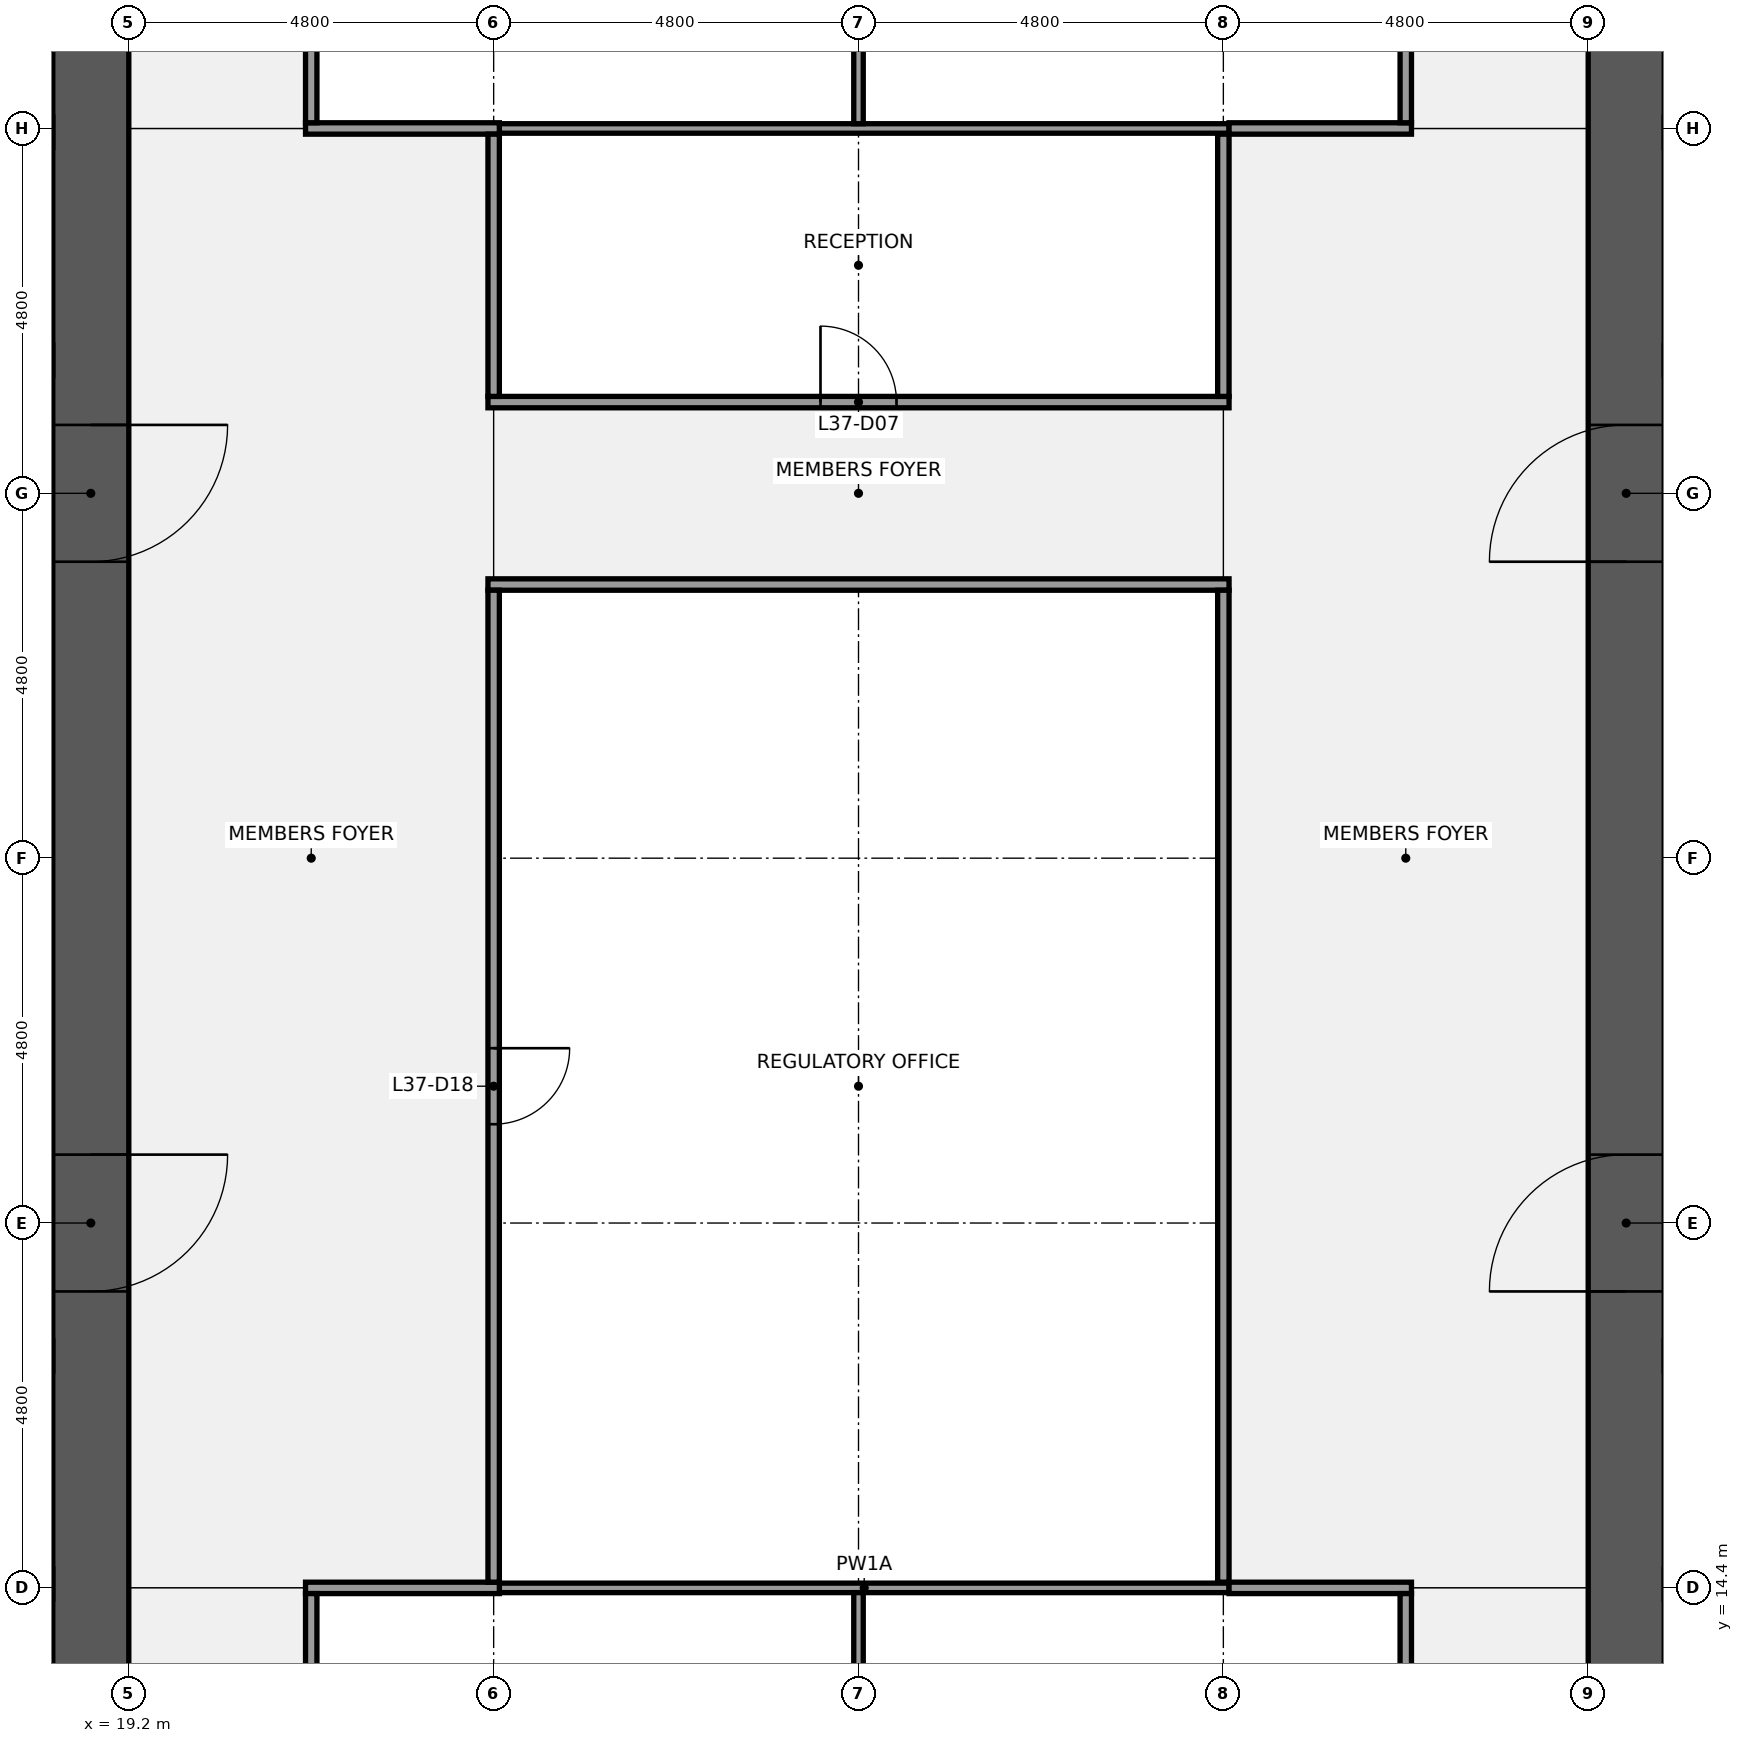
"""IFC4 building model, lengths in metres.
Left out: names, types, materials, properties, quantities, classifications, styles, units other than length and angle.
Written with IfcOpenShell. Run it as: python <this file> out.ifc"""

import sys

from ifc_helpers import new_model, si_unit, direction, frame, frame_2d, origin, place, context, subcontext, project, spatial, rectangle, extrude, element, fill, save


model = new_model("IFC4")
c1 = context("Model", 3, precision=1e-05, world=origin(), true_north=direction((0.0, 1.0)))
c2 = subcontext(c1, "Body", "Model", "MODEL_VIEW")
j1 = project(units=[si_unit("LENGTHUNIT", "METRE"), si_unit("PLANEANGLEUNIT", "RADIAN")], contexts=[c1])
p1 = place(None, origin())
s1 = spatial("IfcSite", under=j1, at=p1, CompositionType="ELEMENT")
p2 = place(p1, origin())
s2 = spatial("IfcBuilding", under=s1, at=p2, CompositionType="ELEMENT")
p3 = place(p2, frame((0.0, 0.0, 168.1)))
s3 = spatial("IfcBuildingStorey", under=s2, at=p3, CompositionType="ELEMENT", Elevation=168.1)
p4 = place(p3, frame((18.7, 38.4, 0.0), z_axis=(0.0, 0.0, 1.0), x_axis=(0.0, -1.0, 0.0)))
e1 = element("IfcWall", 1, at=p4, inside=s3, PredefinedType="SHEAR", context=c2, shape_type="SweptSolid", body=[
    extrude(rectangle(XDim=28.8, YDim=1.0, at=frame_2d((14.4, 0.0))), origin(), (0.0, 0.0, 1.0), 3.84),
])
p5 = place(p4, frame((18.3, 0.0, 0.0)))
e2 = element("IfcOpeningElement", 2, at=p5, cuts=e1, PredefinedType="OPENING", context=c2, shape_type="SweptSolid", body=[
    extrude(rectangle(XDim=1.8, YDim=2.1, at=frame_2d((0.9, 1.05))), frame((0.0, 0.51, 0.0), z_axis=(0.0, -1.0, 0.0), x_axis=(1.0, 0.0, 0.0)), (0.0, 0.0, 1.0), 1.02),
])
p6 = place(p4, frame((8.7, 0.0, 0.0)))
e3 = element("IfcOpeningElement", 3, at=p6, cuts=e1, PredefinedType="OPENING", context=c2, shape_type="SweptSolid", body=[
    extrude(rectangle(XDim=1.8, YDim=2.1, at=frame_2d((0.9, 1.05))), frame((0.0, 0.51, 0.0), z_axis=(0.0, -1.0, 0.0), x_axis=(1.0, 0.0, 0.0)), (0.0, 0.0, 1.0), 1.02),
])
p7 = place(p3, frame((1.0, 14.45, 0.0), z_axis=(0.0, 0.0, 1.0), x_axis=(1.0, 0.0, 0.0)))
e4 = element("IfcWall", 4, at=p7, inside=s3, PredefinedType="SHEAR", context=c2, shape_type="SweptSolid", body=[
    extrude(rectangle(XDim=17.2, YDim=0.4, at=frame_2d((8.6, 0.0))), origin(), (0.0, 0.0, 1.0), 3.84),
])
p8 = place(p3, frame((1.0, 17.45, 0.0), z_axis=(0.0, 0.0, 1.0), x_axis=(1.0, 0.0, 0.0)))
e5 = element("IfcWall", 5, at=p8, inside=s3, PredefinedType="SHEAR", context=c2, shape_type="SweptSolid", body=[
    extrude(rectangle(XDim=17.2, YDim=0.4, at=frame_2d((8.6, 0.0))), origin(), (0.0, 0.0, 1.0), 3.84),
])
p9 = place(p8, frame((1.663, 0.0, 0.0)))
e6 = element("IfcOpeningElement", 6, at=p9, cuts=e5, PredefinedType="OPENING", context=c2, shape_type="SweptSolid", body=[
    extrude(rectangle(XDim=1.0, YDim=2.1, at=frame_2d((0.5, 1.05))), frame((0.0, 0.21, 0.0), z_axis=(0.0, -1.0, 0.0), x_axis=(1.0, 0.0, 0.0)), (0.0, 0.0, 1.0), 0.42),
])
p10 = place(p8, frame((5.1, 0.0, 0.0)))
e7 = element("IfcOpeningElement", 7, at=p10, cuts=e5, PredefinedType="OPENING", context=c2, shape_type="SweptSolid", body=[
    extrude(rectangle(XDim=1.0, YDim=2.1, at=frame_2d((0.5, 1.05))), frame((0.0, 0.21, 0.0), z_axis=(0.0, -1.0, 0.0), x_axis=(1.0, 0.0, 0.0)), (0.0, 0.0, 1.0), 0.42),
])
p11 = place(p8, frame((9.3, 0.0, 0.0)))
e8 = element("IfcOpeningElement", 8, at=p11, cuts=e5, PredefinedType="OPENING", context=c2, shape_type="SweptSolid", body=[
    extrude(rectangle(XDim=1.0, YDim=2.1, at=frame_2d((0.5, 1.05))), frame((0.0, 0.21, 0.0), z_axis=(0.0, -1.0, 0.0), x_axis=(1.0, 0.0, 0.0)), (0.0, 0.0, 1.0), 0.42),
])
p12 = place(p8, frame((14.538, 0.0, 0.0)))
e9 = element("IfcOpeningElement", 9, at=p12, cuts=e5, PredefinedType="OPENING", context=c2, shape_type="SweptSolid", body=[
    extrude(rectangle(XDim=1.0, YDim=2.1, at=frame_2d((0.5, 1.05))), frame((0.0, 0.21, 0.0), z_axis=(0.0, -1.0, 0.0), x_axis=(1.0, 0.0, 0.0)), (0.0, 0.0, 1.0), 0.42),
])
p13 = place(p3, frame((1.0, 30.55, 0.0), z_axis=(0.0, 0.0, 1.0), x_axis=(1.0, 0.0, 0.0)))
e10 = element("IfcWall", 10, at=p13, inside=s3, PredefinedType="SHEAR", context=c2, shape_type="SweptSolid", body=[
    extrude(rectangle(XDim=17.2, YDim=0.4, at=frame_2d((8.6, 0.0))), origin(), (0.0, 0.0, 1.0), 3.84),
])
p14 = place(p13, frame((3.163, 0.0, 0.0)))
e11 = element("IfcOpeningElement", 11, at=p14, cuts=e10, PredefinedType="OPENING", context=c2, shape_type="SweptSolid", body=[
    extrude(rectangle(XDim=1.0, YDim=2.1, at=frame_2d((0.5, 1.05))), frame((0.0, 0.21, 0.0), z_axis=(0.0, -1.0, 0.0), x_axis=(1.0, 0.0, 0.0)), (0.0, 0.0, 1.0), 0.42),
])
p15 = place(p13, frame((8.7, 0.0, 0.0)))
e12 = element("IfcOpeningElement", 12, at=p15, cuts=e10, PredefinedType="OPENING", context=c2, shape_type="SweptSolid", body=[
    extrude(rectangle(XDim=1.0, YDim=2.1, at=frame_2d((0.5, 1.05))), frame((0.0, 0.21, 0.0), z_axis=(0.0, -1.0, 0.0), x_axis=(1.0, 0.0, 0.0)), (0.0, 0.0, 1.0), 0.42),
])
p16 = place(p13, frame((12.0, 0.0, 0.0)))
e13 = element("IfcOpeningElement", 13, at=p16, cuts=e10, PredefinedType="OPENING", context=c2, shape_type="SweptSolid", body=[
    extrude(rectangle(XDim=1.0, YDim=2.1, at=frame_2d((0.5, 1.05))), frame((0.0, 0.21, 0.0), z_axis=(0.0, -1.0, 0.0), x_axis=(1.0, 0.0, 0.0)), (0.0, 0.0, 1.0), 0.42),
])
p17 = place(p13, frame((15.137, 0.0, 0.0)))
e14 = element("IfcOpeningElement", 14, at=p17, cuts=e10, PredefinedType="OPENING", context=c2, shape_type="SweptSolid", body=[
    extrude(rectangle(XDim=1.0, YDim=2.1, at=frame_2d((0.5, 1.05))), frame((0.0, 0.21, 0.0), z_axis=(0.0, -1.0, 0.0), x_axis=(1.0, 0.0, 0.0)), (0.0, 0.0, 1.0), 0.42),
])
p18 = place(p3, frame((1.0, 33.55, 0.0), z_axis=(0.0, 0.0, 1.0), x_axis=(1.0, 0.0, 0.0)))
e15 = element("IfcWall", 15, at=p18, inside=s3, PredefinedType="SHEAR", context=c2, shape_type="SweptSolid", body=[
    extrude(rectangle(XDim=17.2, YDim=0.4, at=frame_2d((8.6, 0.0))), origin(), (0.0, 0.0, 1.0), 3.84),
])
p19 = place(p3, frame((38.9, 9.6, 0.0), z_axis=(0.0, 0.0, 1.0), x_axis=(0.0, 1.0, 0.0)))
e16 = element("IfcWall", 16, at=p19, inside=s3, PredefinedType="SHEAR", context=c2, shape_type="SweptSolid", body=[
    extrude(rectangle(XDim=28.8, YDim=1.0, at=frame_2d((14.4, 0.0))), origin(), (0.0, 0.0, 1.0), 3.84),
])
p20 = place(p19, frame((8.7, 0.0, 0.0)))
e17 = element("IfcOpeningElement", 17, at=p20, cuts=e16, PredefinedType="OPENING", context=c2, shape_type="SweptSolid", body=[
    extrude(rectangle(XDim=1.8, YDim=2.1, at=frame_2d((0.9, 1.05))), frame((0.0, 0.51, 0.0), z_axis=(0.0, -1.0, 0.0), x_axis=(1.0, 0.0, 0.0)), (0.0, 0.0, 1.0), 1.02),
])
p21 = place(p19, frame((18.3, 0.0, 0.0)))
e18 = element("IfcOpeningElement", 18, at=p21, cuts=e16, PredefinedType="OPENING", context=c2, shape_type="SweptSolid", body=[
    extrude(rectangle(XDim=1.8, YDim=2.1, at=frame_2d((0.9, 1.05))), frame((0.0, 0.51, 0.0), z_axis=(0.0, -1.0, 0.0), x_axis=(1.0, 0.0, 0.0)), (0.0, 0.0, 1.0), 1.02),
])
p22 = place(p3, frame((24.075, 14.4, 0.0), z_axis=(0.0, 0.0, 1.0), x_axis=(1.0, 0.0, 0.0)))
e19 = element("IfcWall", 19, at=p22, inside=s3, PredefinedType="PARTITIONING", context=c2, shape_type="SweptSolid", body=[
    extrude(rectangle(XDim=9.6, YDim=0.125, at=frame_2d((4.8, 0.0))), origin(), (0.0, 0.0, 1.0), 2.936),
])
p23 = place(p3, frame((21.525, 14.4, 0.0), z_axis=(0.0, 0.0, 1.0), x_axis=(1.0, 0.0, 0.0)))
e20 = element("IfcWall", 20, at=p23, inside=s3, PredefinedType="PARTITIONING", context=c2, shape_type="SweptSolid", body=[
    extrude(rectangle(XDim=2.55, YDim=0.15, at=frame_2d((1.275, 0.0))), origin(), (0.0, 0.0, 1.0), 2.936),
])
p24 = place(p3, frame((33.675, 14.4, 0.0), z_axis=(0.0, 0.0, 1.0), x_axis=(1.0, 0.0, 0.0)))
e21 = element("IfcWall", 21, at=p24, inside=s3, PredefinedType="PARTITIONING", context=c2, shape_type="SweptSolid", body=[
    extrude(rectangle(XDim=2.4, YDim=0.15, at=frame_2d((1.2, 0.0))), origin(), (0.0, 0.0, 1.0), 2.936),
])
p25 = place(p3, frame((23.925, 27.6, 0.0), z_axis=(0.0, 0.0, 1.0), x_axis=(1.0, 0.0, 0.0)))
e22 = element("IfcWall", 22, at=p25, inside=s3, PredefinedType="PARTITIONING", context=c2, shape_type="SweptSolid", body=[
    extrude(rectangle(XDim=9.75, YDim=0.15, at=frame_2d((4.875, 0.0))), origin(), (0.0, 0.0, 1.0), 2.936),
])
p26 = place(p3, frame((23.925, 30.0, 0.0), z_axis=(0.0, 0.0, 1.0), x_axis=(1.0, 0.0, 0.0)))
e23 = element("IfcWall", 23, at=p26, inside=s3, PredefinedType="PARTITIONING", context=c2, shape_type="SweptSolid", body=[
    extrude(rectangle(XDim=9.75, YDim=0.15, at=frame_2d((4.875, 0.0))), origin(), (0.0, 0.0, 1.0), 2.936),
])
p27 = place(p26, frame((4.375, 0.0, 0.0)))
e24 = element("IfcOpeningElement", 24, at=p27, cuts=e23, PredefinedType="OPENING", context=c2, shape_type="SweptSolid", body=[
    extrude(rectangle(XDim=1.0, YDim=2.1, at=frame_2d((0.5, 1.05))), frame((0.0, 0.085, 0.0), z_axis=(0.0, -1.0, 0.0), x_axis=(1.0, 0.0, 0.0)), (0.0, 0.0, 1.0), 0.17),
])
p28 = place(p3, frame((24.075, 33.6, 0.0), z_axis=(0.0, 0.0, 1.0), x_axis=(1.0, 0.0, 0.0)))
e25 = element("IfcWall", 25, at=p28, inside=s3, PredefinedType="PARTITIONING", context=c2, shape_type="SweptSolid", body=[
    extrude(rectangle(XDim=9.6, YDim=0.125, at=frame_2d((4.8, 0.0))), origin(), (0.0, 0.0, 1.0), 2.936),
])
p29 = place(p3, frame((21.525, 33.6, 0.0), z_axis=(0.0, 0.0, 1.0), x_axis=(1.0, 0.0, 0.0)))
e26 = element("IfcWall", 26, at=p29, inside=s3, PredefinedType="PARTITIONING", context=c2, shape_type="SweptSolid", body=[
    extrude(rectangle(XDim=2.55, YDim=0.15, at=frame_2d((1.275, 0.0))), origin(), (0.0, 0.0, 1.0), 2.936),
])
p30 = place(p3, frame((33.675, 33.6, 0.0), z_axis=(0.0, 0.0, 1.0), x_axis=(1.0, 0.0, 0.0)))
e27 = element("IfcWall", 27, at=p30, inside=s3, PredefinedType="PARTITIONING", context=c2, shape_type="SweptSolid", body=[
    extrude(rectangle(XDim=2.4, YDim=0.15, at=frame_2d((1.2, 0.0))), origin(), (0.0, 0.0, 1.0), 2.936),
])
for number, where, z_axis, x_axis in (
    (28, (21.6, 9.675, 0.0), (0.0, 0.0, 1.0), (0.0, 1.0, 0.0)),
    (29, (21.6, 33.675, 0.0), (0.0, 0.0, 1.0), (0.0, 1.0, 0.0)),
):
    element("IfcWall", number, at=place(p3, frame(where, z_axis=z_axis, x_axis=x_axis)), inside=s3, PredefinedType="PARTITIONING", context=c2, shape_type="SweptSolid", body=[
        extrude(rectangle(XDim=4.65, YDim=0.15, at=frame_2d((2.325, 0.0))), origin(), (0.0, 0.0, 1.0), 2.936),
    ])
p31 = place(p3, frame((24.0, 14.475, 0.0), z_axis=(0.0, 0.0, 1.0), x_axis=(0.0, 1.0, 0.0)))
e30 = element("IfcWall", 30, at=p31, inside=s3, PredefinedType="PARTITIONING", context=c2, shape_type="SweptSolid", body=[
    extrude(rectangle(XDim=13.05, YDim=0.15, at=frame_2d((6.525, 0.0))), origin(), (0.0, 0.0, 1.0), 2.936),
])
p32 = place(p31, frame((6.025, 0.0, 0.0)))
e31 = element("IfcOpeningElement", 31, at=p32, cuts=e30, PredefinedType="OPENING", context=c2, shape_type="SweptSolid", body=[
    extrude(rectangle(XDim=1.0, YDim=2.1, at=frame_2d((0.5, 1.05))), frame((0.0, 0.085, 0.0), z_axis=(0.0, -1.0, 0.0), x_axis=(1.0, 0.0, 0.0)), (0.0, 0.0, 1.0), 0.17),
])
p33 = place(p3, frame((24.0, 30.075, 0.0), z_axis=(0.0, 0.0, 1.0), x_axis=(0.0, 1.0, 0.0)))
e32 = element("IfcWall", 32, at=p33, inside=s3, PredefinedType="PARTITIONING", context=c2, shape_type="SweptSolid", body=[
    extrude(rectangle(XDim=3.45, YDim=0.15, at=frame_2d((1.725, 0.0))), origin(), (0.0, 0.0, 1.0), 2.936),
])
for number, where, z_axis, x_axis in (
    (33, (28.8, 9.675, 0.0), (0.0, 0.0, 1.0), (0.0, 1.0, 0.0)),
    (34, (28.8, 33.663, 0.0), (0.0, 0.0, 1.0), (0.0, 1.0, 0.0)),
):
    element("IfcWall", number, at=place(p3, frame(where, z_axis=z_axis, x_axis=x_axis)), inside=s3, PredefinedType="PARTITIONING", context=c2, shape_type="SweptSolid", body=[
        extrude(rectangle(XDim=4.662, YDim=0.125, at=frame_2d((2.331, 0.0))), origin(), (0.0, 0.0, 1.0), 2.936),
    ])
p34 = place(p3, frame((33.6, 14.475, 0.0), z_axis=(0.0, 0.0, 1.0), x_axis=(0.0, 1.0, 0.0)))
e35 = element("IfcWall", 35, at=p34, inside=s3, PredefinedType="PARTITIONING", context=c2, shape_type="SweptSolid", body=[
    extrude(rectangle(XDim=13.05, YDim=0.15, at=frame_2d((6.525, 0.0))), origin(), (0.0, 0.0, 1.0), 2.936),
])
p35 = place(p3, frame((33.6, 30.075, 0.0), z_axis=(0.0, 0.0, 1.0), x_axis=(0.0, 1.0, 0.0)))
e36 = element("IfcWall", 36, at=p35, inside=s3, PredefinedType="PARTITIONING", context=c2, shape_type="SweptSolid", body=[
    extrude(rectangle(XDim=3.45, YDim=0.15, at=frame_2d((1.725, 0.0))), origin(), (0.0, 0.0, 1.0), 2.936),
])
for number, where, z_axis, x_axis in (
    (37, (36.0, 9.675, 0.0), (0.0, 0.0, 1.0), (0.0, 1.0, 0.0)),
    (38, (36.0, 33.675, 0.0), (0.0, 0.0, 1.0), (0.0, 1.0, 0.0)),
):
    element("IfcWall", number, at=place(p3, frame(where, z_axis=z_axis, x_axis=x_axis)), inside=s3, PredefinedType="PARTITIONING", context=c2, shape_type="SweptSolid", body=[
        extrude(rectangle(XDim=4.65, YDim=0.15, at=frame_2d((2.325, 0.0))), origin(), (0.0, 0.0, 1.0), 2.936),
    ])
p36 = place(p5, origin())
e39 = element("IfcDoor", 39, at=p36, inside=s3, OperationType="DOUBLE_DOOR_SINGLE_SWING", PredefinedType="DOOR", context=c2, shape_type="SweptSolid", body=[
    extrude(rectangle(XDim=1.8, YDim=2.1, at=frame_2d((0.9, 1.05))), frame((0.0, 0.025, 0.0), z_axis=(0.0, -1.0, 0.0), x_axis=(1.0, 0.0, 0.0)), (0.0, 0.0, 1.0), 0.05),
])
fill(e2, e39)
p37 = place(p6, origin())
e40 = element("IfcDoor", 40, at=p37, inside=s3, OperationType="DOUBLE_DOOR_SINGLE_SWING", PredefinedType="DOOR", context=c2, shape_type="SweptSolid", body=[
    extrude(rectangle(XDim=1.8, YDim=2.1, at=frame_2d((0.9, 1.05))), frame((0.0, 0.025, 0.0), z_axis=(0.0, -1.0, 0.0), x_axis=(1.0, 0.0, 0.0)), (0.0, 0.0, 1.0), 0.05),
])
fill(e3, e40)
p38 = place(p20, origin())
e41 = element("IfcDoor", 41, at=p38, inside=s3, OperationType="DOUBLE_DOOR_SINGLE_SWING", PredefinedType="DOOR", context=c2, shape_type="SweptSolid", body=[
    extrude(rectangle(XDim=1.8, YDim=2.1, at=frame_2d((0.9, 1.05))), frame((0.0, 0.025, 0.0), z_axis=(0.0, -1.0, 0.0), x_axis=(1.0, 0.0, 0.0)), (0.0, 0.0, 1.0), 0.05),
])
fill(e17, e41)
p39 = place(p21, origin())
e42 = element("IfcDoor", 42, at=p39, inside=s3, OperationType="DOUBLE_DOOR_SINGLE_SWING", PredefinedType="DOOR", context=c2, shape_type="SweptSolid", body=[
    extrude(rectangle(XDim=1.8, YDim=2.1, at=frame_2d((0.9, 1.05))), frame((0.0, 0.025, 0.0), z_axis=(0.0, -1.0, 0.0), x_axis=(1.0, 0.0, 0.0)), (0.0, 0.0, 1.0), 0.05),
])
fill(e18, e42)
p40 = place(p27, origin())
e43 = element("IfcDoor", 43, at=p40, inside=s3, OperationType="SINGLE_SWING_LEFT", PredefinedType="DOOR", context=c2, shape_type="SweptSolid", body=[
    extrude(rectangle(XDim=1.0, YDim=2.1, at=frame_2d((0.5, 1.05))), frame((0.0, 0.025, 0.0), z_axis=(0.0, -1.0, 0.0), x_axis=(1.0, 0.0, 0.0)), (0.0, 0.0, 1.0), 0.05),
])
fill(e24, e43)
p41 = place(p32, origin())
e44 = element("IfcDoor", 44, at=p41, inside=s3, OperationType="SINGLE_SWING_RIGHT", PredefinedType="DOOR", context=c2, shape_type="SweptSolid", body=[
    extrude(rectangle(XDim=1.0, YDim=2.1, at=frame_2d((0.5, 1.05))), frame((0.0, 0.025, 0.0), z_axis=(0.0, -1.0, 0.0), x_axis=(1.0, 0.0, 0.0)), (0.0, 0.0, 1.0), 0.05),
])
fill(e31, e44)
save(model, sys.argv[1])
